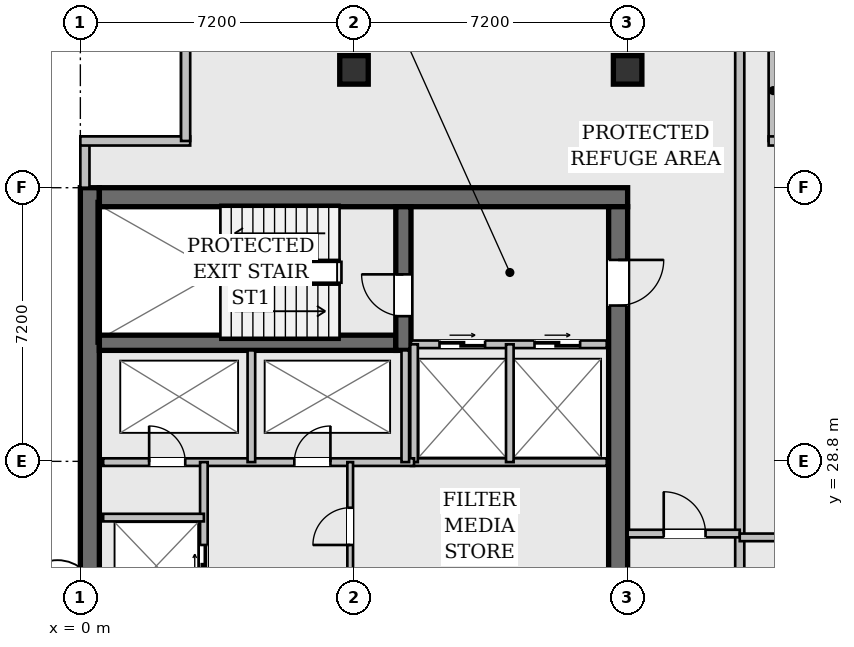
"""IFC4 building model, lengths in metres.
Left out: names, types, materials, properties, quantities, classifications, styles, units other than length and angle.
Written with IfcOpenShell. Run it as: python <this file> out.ifc"""

import sys

from ifc_helpers import new_model, si_unit, direction, frame, frame_2d, origin, origin_2d, place, context, subcontext, project, spatial, rectangle, hollow_rectangle, extrude, element, fill, save


model = new_model("IFC4")
c1 = context("Model", 3, precision=1e-05, world=origin(), true_north=direction((0.0, 1.0)))
c2 = subcontext(c1, "Body", "Model", "MODEL_VIEW")
j1 = project(units=[si_unit("LENGTHUNIT", "METRE"), si_unit("PLANEANGLEUNIT", "RADIAN")], contexts=[c1])
p1 = place(None, origin())
s1 = spatial("IfcSite", under=j1, at=p1, CompositionType="ELEMENT")
p2 = place(p1, origin())
s2 = spatial("IfcBuilding", under=s1, at=p2, CompositionType="ELEMENT")
p3 = place(p2, frame((0.0, 0.0, 232.75)))
s3 = spatial("IfcBuildingStorey", under=s2, at=p3, CompositionType="ELEMENT", Elevation=232.75)
p4 = place(p3, frame((0.25, 7.2, 0.0), z_axis=(0.0, 0.0, 1.0), x_axis=(0.0, 1.0, 0.0)))
e1 = element("IfcWall", 1, at=p4, inside=s3, PredefinedType="SHEAR", context=c2, shape_type="SweptSolid", body=[
    extrude(rectangle(XDim=28.8, YDim=0.5, at=frame_2d((14.4, 0.0))), origin(), (0.0, 0.0, 1.0), 3.94),
])
p5 = place(p3, frame((0.5, 35.75, 0.0), z_axis=(0.0, 0.0, 1.0), x_axis=(1.0, 0.0, 0.0)))
e2 = element("IfcWall", 2, at=p5, inside=s3, PredefinedType="SHEAR", context=c2, shape_type="SweptSolid", body=[
    extrude(rectangle(XDim=13.9, YDim=0.5, at=frame_2d((6.95, 0.0))), origin(), (0.0, 0.0, 1.0), 3.94),
])
p6 = place(p3, frame((14.15, 35.5, 0.0), z_axis=(0.0, 0.0, 1.0), x_axis=(0.0, -1.0, 0.0)))
e3 = element("IfcWall", 3, at=p6, inside=s3, PredefinedType="SHEAR", context=c2, shape_type="SweptSolid", body=[
    extrude(rectangle(XDim=27.8, YDim=0.5, at=frame_2d((13.9, 0.0))), origin(), (0.0, 0.0, 1.0), 3.94),
])
p7 = place(p6, frame((1.4, 0.0, 0.0)))
e4 = element("IfcOpeningElement", 4, at=p7, cuts=e3, PredefinedType="OPENING", context=c2, shape_type="SweptSolid", body=[
    extrude(rectangle(XDim=1.2, YDim=2.15, at=frame_2d((0.6, 1.075))), frame((0.0, 0.262, 0.0), z_axis=(0.0, -1.0, 0.0), x_axis=(1.0, 0.0, 0.0)), (0.0, 0.0, 1.0), 0.524),
])
p8 = place(p6, frame((25.35, 0.0, 0.0)))
e5 = element("IfcOpeningElement", 5, at=p8, cuts=e3, PredefinedType="OPENING", context=c2, shape_type="SweptSolid", body=[
    extrude(rectangle(XDim=1.2, YDim=2.15, at=frame_2d((0.6, 1.075))), frame((0.0, 0.262, 0.0), z_axis=(0.0, -1.0, 0.0), x_axis=(1.0, 0.0, 0.0)), (0.0, 0.0, 1.0), 0.524),
])
p9 = place(p6, frame((14.7, 0.0, 0.0)))
e6 = element("IfcOpeningElement", 6, at=p9, cuts=e3, PredefinedType="OPENING", context=c2, shape_type="SweptSolid", body=[
    extrude(rectangle(XDim=1.6, YDim=2.2, at=frame_2d((0.8, 1.1))), frame((0.0, 0.262, 0.0), z_axis=(0.0, -1.0, 0.0), x_axis=(1.0, 0.0, 0.0)), (0.0, 0.0, 1.0), 0.524),
])
p10 = place(p3, frame((0.5, 31.92, 0.0), z_axis=(0.0, 0.0, 1.0), x_axis=(1.0, 0.0, 0.0)))
e7 = element("IfcWall", 7, at=p10, inside=s3, PredefinedType="SHEAR", context=c2, shape_type="SweptSolid", body=[
    extrude(rectangle(XDim=7.8, YDim=0.4, at=frame_2d((3.9, 0.0))), origin(), (0.0, 0.0, 1.0), 3.94),
])
p11 = place(p3, frame((8.5, 31.72, 0.0), z_axis=(0.0, 0.0, 1.0), x_axis=(0.0, 1.0, 0.0)))
e8 = element("IfcWall", 8, at=p11, inside=s3, PredefinedType="SHEAR", context=c2, shape_type="SweptSolid", body=[
    extrude(rectangle(XDim=3.78, YDim=0.4, at=frame_2d((1.89, 0.0))), origin(), (0.0, 0.0, 1.0), 3.94),
])
p12 = place(p11, frame((0.9, 0.0, 0.0)))
e9 = element("IfcOpeningElement", 9, at=p12, cuts=e8, PredefinedType="OPENING", context=c2, shape_type="SweptSolid", body=[
    extrude(rectangle(XDim=1.1, YDim=2.15, at=frame_2d((0.55, 1.075))), frame((0.0, 0.212, 0.0), z_axis=(0.0, -1.0, 0.0), x_axis=(1.0, 0.0, 0.0)), (0.0, 0.0, 1.0), 0.424),
])
for number, where, z_axis, x_axis in (
    (10, (7.2, 39.1, 0.0), (0.0, 0.0, 1.0), (1.0, 0.0, 0.0)),
    (11, (14.4, 39.1, 0.0), (0.0, 0.0, 1.0), (1.0, 0.0, 0.0)),
):
    element("IfcColumn", number, at=place(p3, frame(where, z_axis=z_axis, x_axis=x_axis)), inside=s3, PredefinedType="COLUMN", context=c2, shape_type="SweptSolid", body=[
        extrude(hollow_rectangle(XDim=0.75, YDim=0.75, WallThickness=0.045, at=origin_2d()), origin(), (0.0, 0.0, 1.0), 3.94),
    ])
p13 = place(p3, frame((0.12, 36.0, 0.0), z_axis=(0.0, 0.0, 1.0), x_axis=(0.0, 1.0, 0.0)))
e12 = element("IfcWall", 12, at=p13, inside=s3, PredefinedType="STANDARD", context=c2, shape_type="SweptSolid", body=[
    extrude(rectangle(XDim=1.23, YDim=0.24, at=frame_2d((0.615, 0.0))), origin(), (0.0, 0.0, 1.0), 3.94),
])
p14 = place(p3, frame((0.0, 37.23, 0.0), z_axis=(0.0, 0.0, 1.0), x_axis=(1.0, 0.0, 0.0)))
e13 = element("IfcWall", 13, at=p14, inside=s3, PredefinedType="STANDARD", context=c2, shape_type="SweptSolid", body=[
    extrude(rectangle(XDim=2.89, YDim=0.24, at=frame_2d((1.445, 0.0))), origin(), (0.0, 0.0, 1.0), 3.94),
])
for number, where, z_axis, x_axis in (
    (14, (2.77, 37.23, 0.0), (0.0, 0.0, 1.0), (0.0, 1.0, 0.0)),
    (15, (18.23, 39.88, 0.0), (0.0, 0.0, 1.0), (0.0, -1.0, 0.0)),
):
    element("IfcWall", number, at=place(p3, frame(where, z_axis=z_axis, x_axis=x_axis)), inside=s3, PredefinedType="STANDARD", context=c2, shape_type="SweptSolid", body=[
        extrude(rectangle(XDim=2.65, YDim=0.24, at=frame_2d((1.325, 0.0))), origin(), (0.0, 0.0, 1.0), 3.94),
    ])
p15 = place(p3, frame((18.11, 37.23, 0.0), z_axis=(0.0, 0.0, 1.0), x_axis=(1.0, 0.0, 0.0)))
e16 = element("IfcWall", 16, at=p15, inside=s3, PredefinedType="STANDARD", context=c2, shape_type="SweptSolid", body=[
    extrude(rectangle(XDim=2.89, YDim=0.24, at=frame_2d((1.445, 0.0))), origin(), (0.0, 0.0, 1.0), 3.94),
])
p16 = place(p3, frame((8.7, 31.88, 0.0), z_axis=(0.0, 0.0, 1.0), x_axis=(1.0, 0.0, 0.0)))
e17 = element("IfcWall", 17, at=p16, inside=s3, PredefinedType="PARTITIONING", context=c2, shape_type="SweptSolid", body=[
    extrude(rectangle(XDim=5.15, YDim=0.2, at=frame_2d((2.575, 0.0))), origin(), (0.0, 0.0, 1.0), 3.94),
])
p17 = place(p16, frame((0.75, 0.0, 0.0)))
e18 = element("IfcOpeningElement", 18, at=p17, cuts=e17, PredefinedType="OPENING", context=c2, shape_type="SweptSolid", body=[
    extrude(rectangle(XDim=1.2, YDim=2.2, at=frame_2d((0.6, 1.1))), frame((0.0, 0.112, 0.0), z_axis=(0.0, -1.0, 0.0), x_axis=(1.0, 0.0, 0.0)), (0.0, 0.0, 1.0), 0.224),
])
p18 = place(p16, frame((3.25, 0.0, 0.0)))
e19 = element("IfcOpeningElement", 19, at=p18, cuts=e17, PredefinedType="OPENING", context=c2, shape_type="SweptSolid", body=[
    extrude(rectangle(XDim=1.2, YDim=2.2, at=frame_2d((0.6, 1.1))), frame((0.0, 0.112, 0.0), z_axis=(0.0, -1.0, 0.0), x_axis=(1.0, 0.0, 0.0)), (0.0, 0.0, 1.0), 0.224),
])
p19 = place(p3, frame((8.7, 28.78, 0.0), z_axis=(0.0, 0.0, 1.0), x_axis=(1.0, 0.0, 0.0)))
e20 = element("IfcWall", 20, at=p19, inside=s3, PredefinedType="PARTITIONING", context=c2, shape_type="SweptSolid", body=[
    extrude(rectangle(XDim=5.15, YDim=0.2, at=frame_2d((2.575, 0.0))), origin(), (0.0, 0.0, 1.0), 3.94),
])
for number, where, z_axis, x_axis in (
    (21, (8.78, 28.78, 0.0), (0.0, 0.0, 1.0), (0.0, 1.0, 0.0)),
    (22, (11.3, 28.78, 0.0), (0.0, 0.0, 1.0), (0.0, 1.0, 0.0)),
):
    element("IfcWall", number, at=place(p3, frame(where, z_axis=z_axis, x_axis=x_axis)), inside=s3, PredefinedType="PARTITIONING", context=c2, shape_type="SweptSolid", body=[
        extrude(rectangle(XDim=3.1, YDim=0.2, at=frame_2d((1.55, 0.0))), origin(), (0.0, 0.0, 1.0), 3.94),
    ])
p20 = place(p3, frame((0.6, 28.78, 0.0), z_axis=(0.0, 0.0, 1.0), x_axis=(1.0, 0.0, 0.0)))
e23 = element("IfcWall", 23, at=p20, inside=s3, PredefinedType="PARTITIONING", context=c2, shape_type="SweptSolid", body=[
    extrude(rectangle(XDim=8.18, YDim=0.2, at=frame_2d((4.09, 0.0))), origin(), (0.0, 0.0, 1.0), 3.94),
])
p21 = place(p20, frame((1.21, 0.0, 0.0)))
e24 = element("IfcOpeningElement", 24, at=p21, cuts=e23, PredefinedType="OPENING", context=c2, shape_type="SweptSolid", body=[
    extrude(rectangle(XDim=0.95, YDim=2.15, at=frame_2d((0.475, 1.075))), frame((0.0, 0.112, 0.0), z_axis=(0.0, -1.0, 0.0), x_axis=(1.0, 0.0, 0.0)), (0.0, 0.0, 1.0), 0.224),
])
p22 = place(p20, frame((5.03, 0.0, 0.0)))
e25 = element("IfcOpeningElement", 25, at=p22, cuts=e23, PredefinedType="OPENING", context=c2, shape_type="SweptSolid", body=[
    extrude(rectangle(XDim=0.95, YDim=2.15, at=frame_2d((0.475, 1.075))), frame((0.0, 0.112, 0.0), z_axis=(0.0, -1.0, 0.0), x_axis=(1.0, 0.0, 0.0)), (0.0, 0.0, 1.0), 0.224),
])
for number, where, z_axis, x_axis in (
    (26, (4.5, 28.78, 0.0), (0.0, 0.0, 1.0), (0.0, 1.0, 0.0)),
    (27, (8.55, 28.78, 0.0), (0.0, 0.0, 1.0), (0.0, 1.0, 0.0)),
):
    element("IfcWall", number, at=place(p3, frame(where, z_axis=z_axis, x_axis=x_axis)), inside=s3, PredefinedType="PARTITIONING", context=c2, shape_type="SweptSolid", body=[
        extrude(rectangle(XDim=2.94, YDim=0.2, at=frame_2d((1.47, 0.0))), origin(), (0.0, 0.0, 1.0), 3.94),
    ])
p23 = place(p3, frame((3.25, 15.7, 0.0), z_axis=(0.0, 0.0, 1.0), x_axis=(0.0, 1.0, 0.0)))
e28 = element("IfcWall", 28, at=p23, inside=s3, PredefinedType="PARTITIONING", context=c2, shape_type="SweptSolid", body=[
    extrude(rectangle(XDim=13.08, YDim=0.2, at=frame_2d((6.54, 0.0))), origin(), (0.0, 0.0, 1.0), 3.94),
])
p24 = place(p23, frame((0.9, 0.0, 0.0)))
e29 = element("IfcOpeningElement", 29, at=p24, cuts=e28, PredefinedType="OPENING", context=c2, shape_type="SweptSolid", body=[
    extrude(rectangle(XDim=1.1, YDim=2.2, at=frame_2d((0.55, 1.1))), frame((0.0, 0.112, 0.0), z_axis=(0.0, -1.0, 0.0), x_axis=(1.0, 0.0, 0.0)), (0.0, 0.0, 1.0), 0.224),
])
p25 = place(p23, frame((3.5, 0.0, 0.0)))
e30 = element("IfcOpeningElement", 30, at=p25, cuts=e28, PredefinedType="OPENING", context=c2, shape_type="SweptSolid", body=[
    extrude(rectangle(XDim=1.1, YDim=2.2, at=frame_2d((0.55, 1.1))), frame((0.0, 0.112, 0.0), z_axis=(0.0, -1.0, 0.0), x_axis=(1.0, 0.0, 0.0)), (0.0, 0.0, 1.0), 0.224),
])
p26 = place(p23, frame((7.2, 0.0, 0.0)))
e31 = element("IfcOpeningElement", 31, at=p26, cuts=e28, PredefinedType="OPENING", context=c2, shape_type="SweptSolid", body=[
    extrude(rectangle(XDim=1.1, YDim=2.2, at=frame_2d((0.55, 1.1))), frame((0.0, 0.112, 0.0), z_axis=(0.0, -1.0, 0.0), x_axis=(1.0, 0.0, 0.0)), (0.0, 0.0, 1.0), 0.224),
])
p27 = place(p23, frame((9.8, 0.0, 0.0)))
e32 = element("IfcOpeningElement", 32, at=p27, cuts=e28, PredefinedType="OPENING", context=c2, shape_type="SweptSolid", body=[
    extrude(rectangle(XDim=1.1, YDim=2.2, at=frame_2d((0.55, 1.1))), frame((0.0, 0.112, 0.0), z_axis=(0.0, -1.0, 0.0), x_axis=(1.0, 0.0, 0.0)), (0.0, 0.0, 1.0), 0.224),
])
p28 = place(p3, frame((0.6, 27.32, 0.0), z_axis=(0.0, 0.0, 1.0), x_axis=(1.0, 0.0, 0.0)))
e33 = element("IfcWall", 33, at=p28, inside=s3, PredefinedType="PARTITIONING", context=c2, shape_type="SweptSolid", body=[
    extrude(rectangle(XDim=2.65, YDim=0.2, at=frame_2d((1.325, 0.0))), origin(), (0.0, 0.0, 1.0), 3.94),
])
p29 = place(p3, frame((7.1, 22.2, 0.0), z_axis=(0.0, 0.0, 1.0), x_axis=(0.0, 1.0, 0.0)))
e34 = element("IfcWall", 34, at=p29, inside=s3, PredefinedType="PARTITIONING", context=c2, shape_type="SweptSolid", body=[
    extrude(rectangle(XDim=6.58, YDim=0.15, at=frame_2d((3.29, 0.0))), origin(), (0.0, 0.0, 1.0), 3.94),
])
p30 = place(p29, frame((1.1, 0.0, 0.0)))
e35 = element("IfcOpeningElement", 35, at=p30, cuts=e34, PredefinedType="OPENING", context=c2, shape_type="SweptSolid", body=[
    extrude(rectangle(XDim=0.98, YDim=2.15, at=frame_2d((0.49, 1.075))), frame((0.0, 0.087, 0.0), z_axis=(0.0, -1.0, 0.0), x_axis=(1.0, 0.0, 0.0)), (0.0, 0.0, 1.0), 0.174),
])
p31 = place(p29, frame((4.4, 0.0, 0.0)))
e36 = element("IfcOpeningElement", 36, at=p31, cuts=e34, PredefinedType="OPENING", context=c2, shape_type="SweptSolid", body=[
    extrude(rectangle(XDim=0.98, YDim=2.15, at=frame_2d((0.49, 1.075))), frame((0.0, 0.087, 0.0), z_axis=(0.0, -1.0, 0.0), x_axis=(1.0, 0.0, 0.0)), (0.0, 0.0, 1.0), 0.174),
])
p32 = place(p3, frame((17.35, 19.85, 0.0), z_axis=(0.0, 0.0, 1.0), x_axis=(0.0, 1.0, 0.0)))
e37 = element("IfcWall", 37, at=p32, inside=s3, PredefinedType="STANDARD", context=c2, shape_type="SweptSolid", body=[
    extrude(rectangle(XDim=19.9, YDim=0.24, at=frame_2d((9.95, 0.0))), origin(), (0.0, 0.0, 1.0), 3.313),
])
p33 = place(p32, frame((1.25, 0.0, 0.0)))
e38 = element("IfcOpeningElement", 38, at=p33, cuts=e37, PredefinedType="OPENING", context=c2, shape_type="SweptSolid", body=[
    extrude(rectangle(XDim=1.0, YDim=2.15, at=frame_2d((0.5, 1.075))), frame((0.0, 0.132, 0.0), z_axis=(0.0, -1.0, 0.0), x_axis=(1.0, 0.0, 0.0)), (0.0, 0.0, 1.0), 0.264),
])
p34 = place(p32, frame((4.75, 0.0, 0.0)))
e39 = element("IfcOpeningElement", 39, at=p34, cuts=e37, PredefinedType="OPENING", context=c2, shape_type="SweptSolid", body=[
    extrude(rectangle(XDim=1.0, YDim=2.15, at=frame_2d((0.5, 1.075))), frame((0.0, 0.132, 0.0), z_axis=(0.0, -1.0, 0.0), x_axis=(1.0, 0.0, 0.0)), (0.0, 0.0, 1.0), 0.264),
])
p35 = place(p3, frame((14.4, 26.9, 0.0), z_axis=(0.0, 0.0, 1.0), x_axis=(1.0, 0.0, 0.0)))
e40 = element("IfcWall", 40, at=p35, inside=s3, PredefinedType="PARTITIONING", context=c2, shape_type="SweptSolid", body=[
    extrude(rectangle(XDim=2.95, YDim=0.2, at=frame_2d((1.475, 0.0))), origin(), (0.0, 0.0, 1.0), 3.508),
])
p36 = place(p35, frame((0.95, 0.0, 0.0)))
e41 = element("IfcOpeningElement", 41, at=p36, cuts=e40, PredefinedType="OPENING", context=c2, shape_type="SweptSolid", body=[
    extrude(rectangle(XDim=1.1, YDim=2.15, at=frame_2d((0.55, 1.075))), frame((0.0, 0.112, 0.0), z_axis=(0.0, -1.0, 0.0), x_axis=(1.0, 0.0, 0.0)), (0.0, 0.0, 1.0), 0.224),
])
p37 = place(p3, frame((17.35, 26.8, 0.0), z_axis=(0.0, 0.0, 1.0), x_axis=(1.0, 0.0, 0.0)))
e42 = element("IfcWall", 42, at=p37, inside=s3, PredefinedType="PARTITIONING", context=c2, shape_type="SweptSolid", body=[
    extrude(rectangle(XDim=3.4, YDim=0.2, at=frame_2d((1.7, 0.0))), origin(), (0.0, 0.0, 1.0), 3.508),
])
p38 = place(p12, origin())
e43 = element("IfcDoor", 43, at=p38, inside=s3, OperationType="SINGLE_SWING_RIGHT", PredefinedType="DOOR", context=c2, shape_type="SweptSolid", body=[
    extrude(rectangle(XDim=1.1, YDim=2.15, at=frame_2d((0.55, 1.075))), frame((0.0, 0.025, 0.0), z_axis=(0.0, -1.0, 0.0), x_axis=(1.0, 0.0, 0.0)), (0.0, 0.0, 1.0), 0.05),
])
fill(e9, e43)
p39 = place(p7, origin())
e44 = element("IfcDoor", 44, at=p39, inside=s3, OperationType="SINGLE_SWING_LEFT", PredefinedType="DOOR", context=c2, shape_type="SweptSolid", body=[
    extrude(rectangle(XDim=1.2, YDim=2.15, at=frame_2d((0.6, 1.075))), frame((0.0, 0.025, 0.0), z_axis=(0.0, -1.0, 0.0), x_axis=(1.0, 0.0, 0.0)), (0.0, 0.0, 1.0), 0.05),
])
fill(e4, e44)
p40 = place(p17, origin())
e45 = element("IfcDoor", 45, at=p40, inside=s3, OperationType="DOUBLE_DOOR_SLIDING", PredefinedType="DOOR", context=c2, shape_type="SweptSolid", body=[
    extrude(rectangle(XDim=1.2, YDim=2.2, at=frame_2d((0.6, 1.1))), frame((0.0, 0.025, 0.0), z_axis=(0.0, -1.0, 0.0), x_axis=(1.0, 0.0, 0.0)), (0.0, 0.0, 1.0), 0.05),
])
fill(e18, e45)
p41 = place(p18, origin())
e46 = element("IfcDoor", 46, at=p41, inside=s3, OperationType="DOUBLE_DOOR_SLIDING", PredefinedType="DOOR", context=c2, shape_type="SweptSolid", body=[
    extrude(rectangle(XDim=1.2, YDim=2.2, at=frame_2d((0.6, 1.1))), frame((0.0, 0.025, 0.0), z_axis=(0.0, -1.0, 0.0), x_axis=(1.0, 0.0, 0.0)), (0.0, 0.0, 1.0), 0.05),
])
fill(e19, e46)
p42 = place(p21, origin())
e47 = element("IfcDoor", 47, at=p42, inside=s3, OperationType="SINGLE_SWING_LEFT", PredefinedType="DOOR", context=c2, shape_type="SweptSolid", body=[
    extrude(rectangle(XDim=0.95, YDim=2.15, at=frame_2d((0.475, 1.075))), frame((0.0, 0.025, 0.0), z_axis=(0.0, -1.0, 0.0), x_axis=(1.0, 0.0, 0.0)), (0.0, 0.0, 1.0), 0.05),
])
fill(e24, e47)
p43 = place(p22, origin())
e48 = element("IfcDoor", 48, at=p43, inside=s3, OperationType="SINGLE_SWING_RIGHT", PredefinedType="DOOR", context=c2, shape_type="SweptSolid", body=[
    extrude(rectangle(XDim=0.95, YDim=2.15, at=frame_2d((0.475, 1.075))), frame((0.0, 0.025, 0.0), z_axis=(0.0, -1.0, 0.0), x_axis=(1.0, 0.0, 0.0)), (0.0, 0.0, 1.0), 0.05),
])
fill(e25, e48)
p44 = place(p27, origin())
e49 = element("IfcDoor", 49, at=p44, inside=s3, OperationType="DOUBLE_DOOR_SLIDING", PredefinedType="DOOR", context=c2, shape_type="SweptSolid", body=[
    extrude(rectangle(XDim=1.1, YDim=2.2, at=frame_2d((0.55, 1.1))), frame((0.0, 0.025, 0.0), z_axis=(0.0, -1.0, 0.0), x_axis=(1.0, 0.0, 0.0)), (0.0, 0.0, 1.0), 0.05),
])
fill(e32, e49)
p45 = place(p31, origin())
e50 = element("IfcDoor", 50, at=p45, inside=s3, OperationType="SINGLE_SWING_LEFT", PredefinedType="DOOR", context=c2, shape_type="SweptSolid", body=[
    extrude(rectangle(XDim=0.98, YDim=2.15, at=frame_2d((0.49, 1.075))), frame((0.0, 0.025, 0.0), z_axis=(0.0, -1.0, 0.0), x_axis=(1.0, 0.0, 0.0)), (0.0, 0.0, 1.0), 0.05),
])
fill(e36, e50)
p46 = place(p36, origin())
e51 = element("IfcDoor", 51, at=p46, inside=s3, OperationType="SINGLE_SWING_LEFT", PredefinedType="DOOR", context=c2, shape_type="SweptSolid", body=[
    extrude(rectangle(XDim=1.1, YDim=2.15, at=frame_2d((0.55, 1.075))), frame((0.0, 0.025, 0.0), z_axis=(0.0, -1.0, 0.0), x_axis=(1.0, 0.0, 0.0)), (0.0, 0.0, 1.0), 0.05),
])
fill(e41, e51)
save(model, sys.argv[1])
